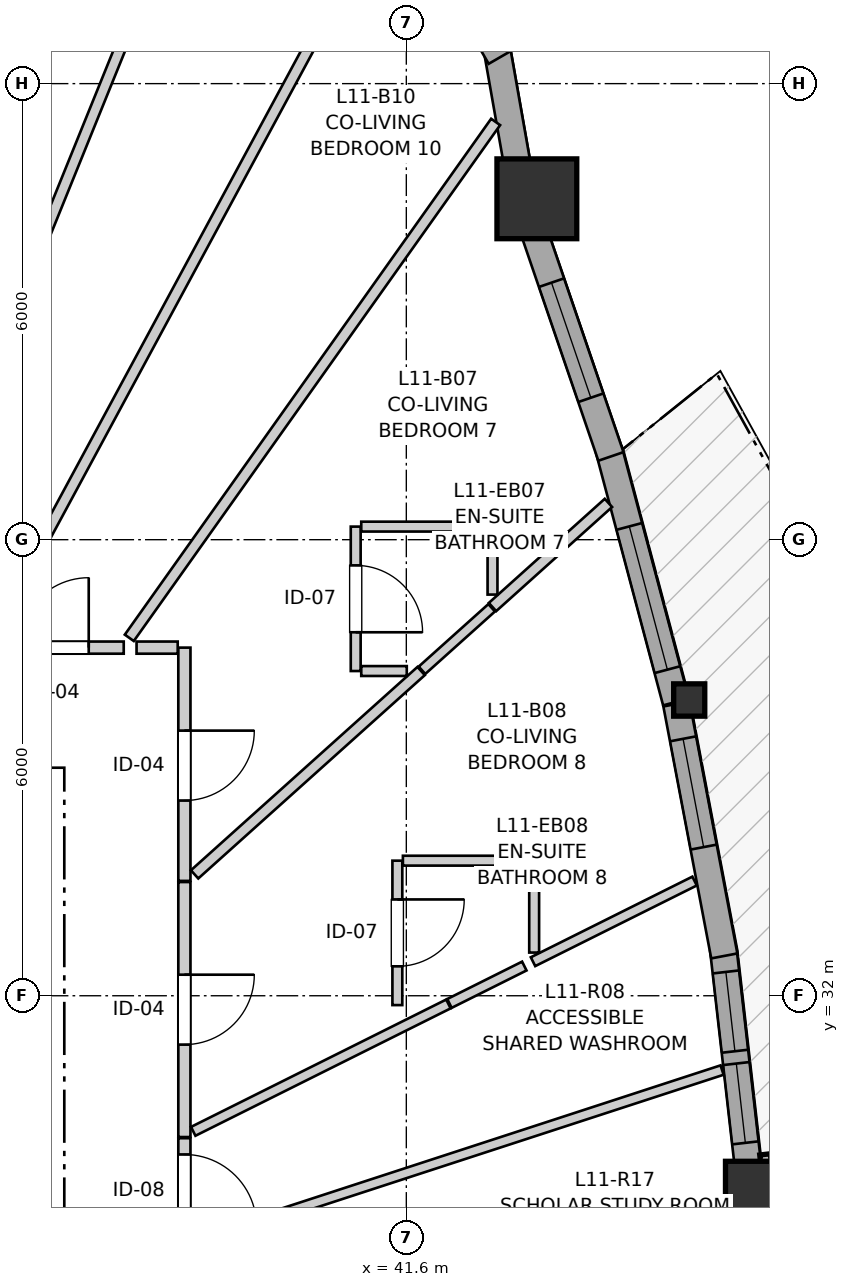
"""IFC4 building model, lengths in metres.
Left out: names, types, materials, properties, quantities, classifications, styles, units other than length and angle.
Written with IfcOpenShell. Run it as: python <this file> out.ifc"""

import sys

from ifc_helpers import new_model, si_unit, direction, frame, frame_2d, origin, origin_2d, place, context, subcontext, project, spatial, rectangle, i_section, extrude, source, transform, mapped, element, fill, save


model = new_model("IFC4")
c1 = context("Model", 3, precision=1e-05, world=origin(), true_north=direction((0.0, 1.0)))
c2 = subcontext(c1, "Body", "Model", "MODEL_VIEW")
j1 = project(units=[si_unit("LENGTHUNIT", "METRE"), si_unit("PLANEANGLEUNIT", "RADIAN")], contexts=[c1])
p1 = place(None, origin())
s1 = spatial("IfcSite", under=j1, at=p1, CompositionType="ELEMENT")
p2 = place(p1, origin())
s2 = spatial("IfcBuilding", under=s1, at=p2, CompositionType="ELEMENT")
p3 = place(p2, frame((0.0, 0.0, 39.8)))
s3 = spatial("IfcBuildingStorey", under=s2, at=p3, CompositionType="ELEMENT", Elevation=39.8)
m1 = source(origin(), c2, "Body", "SweptSolid", [
    extrude(rectangle(XDim=1.05, YDim=1.05, at=origin_2d()), origin(), (0.0, 0.0, 1.0), 2.94),
])
p4 = place(p3, frame((46.324, 29.297, 0.0), z_axis=(0.0, 0.0, 1.0), x_axis=(1.0, 0.0, 0.0)))
e1 = element("IfcColumn", 1, at=p4, inside=s3, PredefinedType="COLUMN", context=c2, shape_type="MappedRepresentation", body=[
    mapped(m1, transform((0.0, 0.0, 0.0), x_axis=(1.0, 0.0, 0.0), y_axis=(0.0, 1.0, 0.0), z_axis=(0.0, 0.0, 1.0), scale=1.0)),
])
m2 = source(origin(), c2, "Body", "SweptSolid", [
    extrude(i_section(OverallWidth=0.409, OverallDepth=0.425, WebThickness=0.03, FlangeThickness=0.048, FilletRadius=0.015, at=origin_2d()), origin(), (0.0, 0.0, 1.0), 2.94),
])
p5 = place(p3, frame((45.322, 35.891, 0.0), z_axis=(0.0, 0.0, 1.0), x_axis=(1.0, 0.0, 0.0)))
e2 = element("IfcColumn", 2, at=p5, inside=s3, PredefinedType="PILASTER", context=c2, shape_type="MappedRepresentation", body=[
    mapped(m2, transform((0.0, 0.0, 0.0), x_axis=(1.0, 0.0, 0.0), y_axis=(0.0, 1.0, 0.0), z_axis=(0.0, 0.0, 1.0), scale=1.0)),
])
p6 = place(p3, frame((43.317, 42.485, 0.0), z_axis=(0.0, 0.0, 1.0), x_axis=(1.0, 0.0, 0.0)))
e3 = element("IfcColumn", 3, at=p6, inside=s3, PredefinedType="COLUMN", context=c2, shape_type="MappedRepresentation", body=[
    mapped(m1, transform((0.0, 0.0, 0.0), x_axis=(1.0, 0.0, 0.0), y_axis=(0.0, 1.0, 0.0), z_axis=(0.0, 0.0, 1.0), scale=1.0)),
])
p7 = place(p3, frame((46.116, 29.575, 0.0), z_axis=(0.0, 0.0, 1.0), x_axis=(-0.113271733229, 0.993564046477, 0.0)))
e4 = element("IfcWall", 4, at=p7, inside=s3, PredefinedType="SOLIDWALL", context=c2, shape_type="SweptSolid", body=[
    extrude(rectangle(XDim=3.056, YDim=0.35, at=frame_2d((1.528, 0.0))), origin(), (0.0, 0.0, 1.0), 2.42),
])
p8 = place(p7, frame((0.492, 0.0, 0.82)))
e5 = element("IfcOpeningElement", 5, at=p8, cuts=e4, PredefinedType="OPENING", context=c2, shape_type="SweptSolid", body=[
    extrude(rectangle(XDim=1.05, YDim=1.45, at=frame_2d((0.525, 0.725))), frame((0.0, 0.185, 0.0), z_axis=(0.0, -1.0, 0.0), x_axis=(1.0, 0.0, 0.0)), (0.0, 0.0, 1.0), 0.37),
])
p9 = place(p7, frame((1.706, 0.0, 0.82)))
e6 = element("IfcOpeningElement", 6, at=p9, cuts=e4, PredefinedType="OPENING", context=c2, shape_type="SweptSolid", body=[
    extrude(rectangle(XDim=1.05, YDim=1.45, at=frame_2d((0.525, 0.725))), frame((0.0, 0.185, 0.0), z_axis=(0.0, -1.0, 0.0), x_axis=(1.0, 0.0, 0.0)), (0.0, 0.0, 1.0), 0.37),
])
p10 = place(p3, frame((45.784, 32.524, 0.0), z_axis=(0.0, 0.0, 1.0), x_axis=(-0.186686485801, 0.982419541754, 0.0)))
e7 = element("IfcWall", 7, at=p10, inside=s3, PredefinedType="SOLIDWALL", context=c2, shape_type="SweptSolid", body=[
    extrude(rectangle(XDim=3.374, YDim=0.35, at=frame_2d((1.687, 0.0))), origin(), (0.0, 0.0, 1.0), 2.42),
])
p11 = place(p10, frame((1.457, 0.0, 0.82)))
e8 = element("IfcOpeningElement", 8, at=p11, cuts=e7, PredefinedType="OPENING", context=c2, shape_type="SweptSolid", body=[
    extrude(rectangle(XDim=1.45, YDim=1.25, at=frame_2d((0.725, 0.625))), frame((0.0, 0.185, 0.0), z_axis=(0.0, -1.0, 0.0), x_axis=(1.0, 0.0, 0.0)), (0.0, 0.0, 1.0), 0.37),
])
p12 = place(p3, frame((45.148, 35.865, 0.0), z_axis=(0.0, 0.0, 1.0), x_axis=(-0.257064434129, 0.966394265663, 0.0)))
e9 = element("IfcWall", 9, at=p12, inside=s3, PredefinedType="SOLIDWALL", context=c2, shape_type="SweptSolid", body=[
    extrude(rectangle(XDim=3.429, YDim=0.35, at=frame_2d((1.715, 0.0))), origin(), (0.0, 0.0, 1.0), 2.42),
])
p13 = place(p12, frame((0.44, 0.0, 0.82)))
e10 = element("IfcOpeningElement", 10, at=p13, cuts=e9, PredefinedType="OPENING", context=c2, shape_type="SweptSolid", body=[
    extrude(rectangle(XDim=1.95, YDim=1.4, at=frame_2d((0.975, 0.7))), frame((0.0, 0.185, 0.0), z_axis=(0.0, -1.0, 0.0), x_axis=(1.0, 0.0, 0.0)), (0.0, 0.0, 1.0), 0.37),
])
p14 = place(p3, frame((44.292, 39.095, 0.0), z_axis=(0.0, 0.0, 1.0), x_axis=(-0.323582370233, 0.946200005112, 0.0)))
e11 = element("IfcWall", 11, at=p14, inside=s3, PredefinedType="SOLIDWALL", context=c2, shape_type="SweptSolid", body=[
    extrude(rectangle(XDim=3.222, YDim=0.35, at=frame_2d((1.611, 0.0))), origin(), (0.0, 0.0, 1.0), 2.42),
])
p15 = place(p14, frame((0.816, 0.0, 0.82)))
e12 = element("IfcOpeningElement", 12, at=p15, cuts=e11, PredefinedType="OPENING", context=c2, shape_type="SweptSolid", body=[
    extrude(rectangle(XDim=1.6, YDim=1.35, at=frame_2d((0.8, 0.675))), frame((0.0, 0.185, 0.0), z_axis=(0.0, -1.0, 0.0), x_axis=(1.0, 0.0, 0.0)), (0.0, 0.0, 1.0), 0.37),
])
p16 = place(p3, frame((43.093, 42.75, 0.0), z_axis=(0.0, 0.0, 1.0), x_axis=(-0.173610462023, 0.984814402553, 0.0)))
e13 = element("IfcWall", 13, at=p16, inside=s3, PredefinedType="SOLIDWALL", context=c2, shape_type="SweptSolid", body=[
    extrude(rectangle(XDim=1.752, YDim=0.35, at=frame_2d((0.876, 0.0))), origin(), (0.0, 0.0, 1.0), 2.42),
])
p17 = place(p3, frame((42.835, 44.348, 0.0), z_axis=(0.0, 0.0, 1.0), x_axis=(-0.499995423472, 0.866028046028, 0.0)))
e14 = element("IfcWall", 14, at=p17, inside=s3, PredefinedType="SOLIDWALL", context=c2, shape_type="SweptSolid", body=[
    extrude(rectangle(XDim=2.09, YDim=0.35, at=frame_2d((1.045, 0.0))), origin(), (0.0, 0.0, 1.0), 2.42),
])
p18 = place(p17, frame((0.42, 0.0, 0.82)))
e15 = element("IfcOpeningElement", 15, at=p18, cuts=e14, PredefinedType="OPENING", context=c2, shape_type="SweptSolid", body=[
    extrude(rectangle(XDim=1.25, YDim=1.35, at=frame_2d((0.625, 0.675))), frame((0.0, 0.185, 0.0), z_axis=(0.0, -1.0, 0.0), x_axis=(1.0, 0.0, 0.0)), (0.0, 0.0, 1.0), 0.37),
])
p19 = place(p3, frame((38.68, 33.496, 0.0), z_axis=(0.0, 0.0, 1.0), x_axis=(0.0, -1.0, 0.0)))
e16 = element("IfcWall", 16, at=p19, inside=s3, PredefinedType="PARTITIONING", context=c2, shape_type="SweptSolid", body=[
    extrude(rectangle(XDim=3.355, YDim=0.16, at=frame_2d((1.677, 0.0))), origin(), (0.0, 0.0, 1.0), 2.94),
])
p20 = place(p19, frame((1.219, 0.0, 0.0)))
e17 = element("IfcOpeningElement", 17, at=p20, cuts=e16, PredefinedType="OPENING", context=c2, shape_type="SweptSolid", body=[
    extrude(rectangle(XDim=0.92, YDim=2.1, at=frame_2d((0.46, 1.05))), frame((0.0, 0.09, 0.0), z_axis=(0.0, -1.0, 0.0), x_axis=(1.0, 0.0, 0.0)), (0.0, 0.0, 1.0), 0.18),
])
p21 = place(p3, frame((38.68, 36.58, 0.0), z_axis=(0.0, 0.0, 1.0), x_axis=(0.0, -1.0, 0.0)))
e18 = element("IfcWall", 18, at=p21, inside=s3, PredefinedType="PARTITIONING", context=c2, shape_type="SweptSolid", body=[
    extrude(rectangle(XDim=3.069, YDim=0.16, at=frame_2d((1.535, 0.0))), origin(), (0.0, 0.0, 1.0), 2.94),
])
p22 = place(p21, frame((1.092, 0.0, 0.0)))
e19 = element("IfcOpeningElement", 19, at=p22, cuts=e18, PredefinedType="OPENING", context=c2, shape_type="SweptSolid", body=[
    extrude(rectangle(XDim=0.92, YDim=2.1, at=frame_2d((0.46, 1.05))), frame((0.0, 0.09, 0.0), z_axis=(0.0, -1.0, 0.0), x_axis=(1.0, 0.0, 0.0)), (0.0, 0.0, 1.0), 0.18),
])
p23 = place(p3, frame((41.482, 33.777, 0.0), z_axis=(0.0, 0.0, 1.0), x_axis=(0.0, -1.0, 0.0)))
e20 = element("IfcWall", 20, at=p23, inside=s3, PredefinedType="PARTITIONING", context=c2, shape_type="SweptSolid", body=[
    extrude(rectangle(XDim=1.9, YDim=0.13, at=frame_2d((0.95, 0.0))), origin(), (0.0, 0.0, 1.0), 2.94),
])
p24 = place(p23, frame((0.51, 0.0, 0.0)))
e21 = element("IfcOpeningElement", 21, at=p24, cuts=e20, PredefinedType="OPENING", context=c2, shape_type="SweptSolid", body=[
    extrude(rectangle(XDim=0.88, YDim=2.05, at=frame_2d((0.44, 1.025))), frame((0.0, 0.075, 0.0), z_axis=(0.0, -1.0, 0.0), x_axis=(1.0, 0.0, 0.0)), (0.0, 0.0, 1.0), 0.15),
])
p25 = place(p3, frame((40.934, 38.172, 0.0), z_axis=(0.0, 0.0, 1.0), x_axis=(0.0, -1.0, 0.0)))
e22 = element("IfcWall", 22, at=p25, inside=s3, PredefinedType="PARTITIONING", context=c2, shape_type="SweptSolid", body=[
    extrude(rectangle(XDim=1.9, YDim=0.13, at=frame_2d((0.95, 0.0))), origin(), (0.0, 0.0, 1.0), 2.94),
])
p26 = place(p25, frame((0.51, 0.0, 0.0)))
e23 = element("IfcOpeningElement", 23, at=p26, cuts=e22, PredefinedType="OPENING", context=c2, shape_type="SweptSolid", body=[
    extrude(rectangle(XDim=0.88, YDim=2.05, at=frame_2d((0.44, 1.025))), frame((0.0, 0.075, 0.0), z_axis=(0.0, -1.0, 0.0), x_axis=(1.0, 0.0, 0.0)), (0.0, 0.0, 1.0), 0.15),
])
p27 = place(p3, frame((36.042, 36.58, 0.0), z_axis=(0.0, 0.0, 1.0), x_axis=(1.0, 0.0, 0.0)))
e24 = element("IfcWall", 24, at=p27, inside=s3, PredefinedType="PARTITIONING", context=c2, shape_type="SweptSolid", body=[
    extrude(rectangle(XDim=1.84, YDim=0.16, at=frame_2d((0.92, 0.0))), origin(), (0.0, 0.0, 1.0), 2.94),
])
p28 = place(p27, frame((0.459, 0.0, 0.0)))
e25 = element("IfcOpeningElement", 25, at=p28, cuts=e24, PredefinedType="OPENING", context=c2, shape_type="SweptSolid", body=[
    extrude(rectangle(XDim=0.92, YDim=2.1, at=frame_2d((0.46, 1.05))), frame((0.0, 0.09, 0.0), z_axis=(0.0, -1.0, 0.0), x_axis=(1.0, 0.0, 0.0)), (0.0, 0.0, 1.0), 0.18),
])
p29 = place(p3, frame((38.68, 30.126, 0.0), z_axis=(0.0, 0.0, 1.0), x_axis=(0.0, -1.0, 0.0)))
e26 = element("IfcWall", 26, at=p29, inside=s3, PredefinedType="PARTITIONING", context=c2, shape_type="SweptSolid", body=[
    extrude(rectangle(XDim=1.426, YDim=0.16, at=frame_2d((0.713, 0.0))), origin(), (0.0, 0.0, 1.0), 2.94),
])
p30 = place(p29, frame((0.214, 0.0, 0.0)))
e27 = element("IfcOpeningElement", 27, at=p30, cuts=e26, PredefinedType="OPENING", context=c2, shape_type="SweptSolid", body=[
    extrude(rectangle(XDim=0.95, YDim=2.1, at=frame_2d((0.475, 1.05))), frame((0.0, 0.09, 0.0), z_axis=(0.0, -1.0, 0.0), x_axis=(1.0, 0.0, 0.0)), (0.0, 0.0, 1.0), 0.18),
])
p31 = place(p3, frame((34.686, 36.695, 0.0), z_axis=(0.0, 0.0, 1.0), x_axis=(0.375735926904, 0.926726773776, 0.0)))
e28 = element("IfcWall", 28, at=p31, inside=s3, PredefinedType="PARTITIONING", context=c2, shape_type="SweptSolid", body=[
    extrude(rectangle(XDim=11.769, YDim=0.145, at=frame_2d((5.884, 0.0))), origin(), (0.0, 0.0, 1.0), 2.94),
])
p32 = place(p3, frame((36.125, 36.701, 0.0), z_axis=(0.0, 0.0, 1.0), x_axis=(0.474948586069, 0.880013545686, 0.0)))
e29 = element("IfcWall", 29, at=p32, inside=s3, PredefinedType="PARTITIONING", context=c2, shape_type="SweptSolid", body=[
    extrude(rectangle(XDim=10.889, YDim=0.145, at=frame_2d((5.445, 0.0))), origin(), (0.0, 0.0, 1.0), 2.94),
])
p33 = place(p3, frame((37.955, 36.708, 0.0), z_axis=(0.0, 0.0, 1.0), x_axis=(0.578991718582, 0.81533342248, 0.0)))
e30 = element("IfcWall", 30, at=p33, inside=s3, PredefinedType="PARTITIONING", context=c2, shape_type="SweptSolid", body=[
    extrude(rectangle(XDim=8.325, YDim=0.145, at=frame_2d((4.163, 0.0))), origin(), (0.0, 0.0, 1.0), 2.94),
])
p34 = place(p3, frame((38.788, 28.751, 0.0), z_axis=(0.0, 0.0, 1.0), x_axis=(0.95075822996, 0.309933522169, 0.0)))
e31 = element("IfcWall", 31, at=p34, inside=s3, PredefinedType="PARTITIONING", context=c2, shape_type="SweptSolid", body=[
    extrude(rectangle(XDim=7.327, YDim=0.13, at=frame_2d((3.664, 0.0))), origin(), (0.0, 0.0, 1.0), 2.94),
])
p35 = place(p3, frame((38.814, 33.597, 0.0), z_axis=(0.0, 0.0, 1.0), x_axis=(0.74417856937, 0.667980730927, 0.0)))
e32 = element("IfcWall", 32, at=p35, inside=s3, PredefinedType="PARTITIONING", context=c2, shape_type="SweptSolid", body=[
    extrude(rectangle(XDim=4.005, YDim=0.145, at=frame_2d((2.002, 0.0))), origin(), (0.0, 0.0, 1.0), 2.94),
])
p36 = place(p3, frame((38.796, 30.216, 0.0), z_axis=(0.0, 0.0, 1.0), x_axis=(0.894739227469, 0.446588977503, 0.0)))
e33 = element("IfcWall", 33, at=p36, inside=s3, PredefinedType="PARTITIONING", context=c2, shape_type="SweptSolid", body=[
    extrude(rectangle(XDim=3.753, YDim=0.13, at=frame_2d((1.876, 0.0))), origin(), (0.0, 0.0, 1.0), 2.94),
])
p37 = place(p3, frame((43.267, 32.448, 0.0), z_axis=(0.0, 0.0, 1.0), x_axis=(0.894755827923, 0.446555717014, 0.0)))
e34 = element("IfcWall", 34, at=p37, inside=s3, PredefinedType="PARTITIONING", context=c2, shape_type="SweptSolid", body=[
    extrude(rectangle(XDim=2.375, YDim=0.13, at=frame_2d((1.188, 0.0))), origin(), (0.0, 0.0, 1.0), 2.94),
])
p38 = place(p3, frame((42.734, 37.114, 0.0), z_axis=(0.0, 0.0, 1.0), x_axis=(0.743962922365, 0.668220899214, 0.0)))
e35 = element("IfcWall", 35, at=p38, inside=s3, PredefinedType="PARTITIONING", context=c2, shape_type="SweptSolid", body=[
    extrude(rectangle(XDim=2.05, YDim=0.145, at=frame_2d((1.025, 0.0))), origin(), (0.0, 0.0, 1.0), 2.94),
])
p39 = place(p3, frame((41.007, 38.172, 0.0), z_axis=(0.0, 0.0, 1.0), x_axis=(1.0, 0.0, 0.0)))
e36 = element("IfcWall", 36, at=p39, inside=s3, PredefinedType="PARTITIONING", context=c2, shape_type="SweptSolid", body=[
    extrude(rectangle(XDim=1.727, YDim=0.13, at=frame_2d((0.863, 0.0))), origin(), (0.0, 0.0, 1.0), 2.94),
])
p40 = place(p3, frame((41.555, 33.777, 0.0), z_axis=(0.0, 0.0, 1.0), x_axis=(1.0, 0.0, 0.0)))
e37 = element("IfcWall", 37, at=p40, inside=s3, PredefinedType="PARTITIONING", context=c2, shape_type="SweptSolid", body=[
    extrude(rectangle(XDim=1.727, YDim=0.13, at=frame_2d((0.864, 0.0))), origin(), (0.0, 0.0, 1.0), 2.94),
])
p41 = place(p3, frame((43.282, 32.568, 0.0), z_axis=(0.0, 0.0, 1.0), x_axis=(0.0, 1.0, 0.0)))
e38 = element("IfcWall", 38, at=p41, inside=s3, PredefinedType="PARTITIONING", context=c2, shape_type="SweptSolid", body=[
    extrude(rectangle(XDim=1.136, YDim=0.13, at=frame_2d((0.568, 0.0))), origin(), (0.0, 0.0, 1.0), 2.94),
])
p42 = place(p3, frame((41.806, 36.282, 0.0), z_axis=(0.0, 0.0, 1.0), x_axis=(0.744525261569, 0.667594289135, 0.0)))
e39 = element("IfcWall", 39, at=p42, inside=s3, PredefinedType="PARTITIONING", context=c2, shape_type="SweptSolid", body=[
    extrude(rectangle(XDim=1.231, YDim=0.13, at=frame_2d((0.616, 0.0))), origin(), (0.0, 0.0, 1.0), 2.94),
])
p43 = place(p3, frame((42.167, 31.899, 0.0), z_axis=(0.0, 0.0, 1.0), x_axis=(0.894604533516, 0.446858734515, 0.0)))
e40 = element("IfcWall", 40, at=p43, inside=s3, PredefinedType="PARTITIONING", context=c2, shape_type="SweptSolid", body=[
    extrude(rectangle(XDim=1.101, YDim=0.13, at=frame_2d((0.55, 0.0))), origin(), (0.0, 0.0, 1.0), 2.94),
])
p44 = place(p3, frame((42.734, 37.278, 0.0), z_axis=(0.0, 0.0, 1.0), x_axis=(0.0, 1.0, 0.0)))
e41 = element("IfcWall", 41, at=p44, inside=s3, PredefinedType="PARTITIONING", context=c2, shape_type="SweptSolid", body=[
    extrude(rectangle(XDim=0.821, YDim=0.13, at=frame_2d((0.411, 0.0))), origin(), (0.0, 0.0, 1.0), 2.94),
])
p45 = place(p3, frame((41.007, 36.272, 0.0), z_axis=(0.0, 0.0, 1.0), x_axis=(1.0, 0.0, 0.0)))
e42 = element("IfcWall", 42, at=p45, inside=s3, PredefinedType="PARTITIONING", context=c2, shape_type="SweptSolid", body=[
    extrude(rectangle(XDim=0.599, YDim=0.13, at=frame_2d((0.299, 0.0))), origin(), (0.0, 0.0, 1.0), 2.94),
])
p46 = place(p3, frame((38.051, 36.58, 0.0), z_axis=(0.0, 0.0, 1.0), x_axis=(1.0, 0.0, 0.0)))
e43 = element("IfcWall", 43, at=p46, inside=s3, PredefinedType="PARTITIONING", context=c2, shape_type="SweptSolid", body=[
    extrude(rectangle(XDim=0.541, YDim=0.16, at=frame_2d((0.271, 0.0))), origin(), (0.0, 0.0, 1.0), 2.94),
])
m3 = source(origin(), c2, "Body", "SweptSolid", [
    extrude(rectangle(XDim=1.05, YDim=1.45, at=frame_2d((0.525, 0.725))), frame((0.0, 0.03, 0.0), z_axis=(0.0, -1.0, 0.0), x_axis=(1.0, 0.0, 0.0)), (0.0, 0.0, 1.0), 0.06),
])
p47 = place(p8, origin())
e44 = element("IfcWindow", 44, at=p47, inside=s3, PartitioningType="SINGLE_PANEL", PredefinedType="WINDOW", context=c2, shape_type="MappedRepresentation", body=[
    mapped(m3, transform((0.0, 0.0, 0.0), x_axis=(1.0, 0.0, 0.0), y_axis=(0.0, 1.0, 0.0), z_axis=(0.0, 0.0, 1.0), scale=1.0)),
])
fill(e5, e44)
p48 = place(p9, origin())
e45 = element("IfcWindow", 45, at=p48, inside=s3, PartitioningType="SINGLE_PANEL", PredefinedType="WINDOW", context=c2, shape_type="MappedRepresentation", body=[
    mapped(m3, transform((0.0, 0.0, 0.0), x_axis=(1.0, 0.0, 0.0), y_axis=(0.0, 1.0, 0.0), z_axis=(0.0, 0.0, 1.0), scale=1.0)),
])
fill(e6, e45)
m4 = source(origin(), c2, "Body", "SweptSolid", [
    extrude(rectangle(XDim=1.45, YDim=1.25, at=frame_2d((0.725, 0.625))), frame((0.0, 0.03, 0.0), z_axis=(0.0, -1.0, 0.0), x_axis=(1.0, 0.0, 0.0)), (0.0, 0.0, 1.0), 0.06),
])
p49 = place(p11, origin())
e46 = element("IfcWindow", 46, at=p49, inside=s3, PartitioningType="SINGLE_PANEL", PredefinedType="WINDOW", context=c2, shape_type="MappedRepresentation", body=[
    mapped(m4, transform((0.0, 0.0, 0.0), x_axis=(1.0, 0.0, 0.0), y_axis=(0.0, 1.0, 0.0), z_axis=(0.0, 0.0, 1.0), scale=1.0)),
])
fill(e8, e46)
m5 = source(origin(), c2, "Body", "SweptSolid", [
    extrude(rectangle(XDim=1.95, YDim=1.4, at=frame_2d((0.975, 0.7))), frame((0.0, 0.03, 0.0), z_axis=(0.0, -1.0, 0.0), x_axis=(1.0, 0.0, 0.0)), (0.0, 0.0, 1.0), 0.06),
])
p50 = place(p13, origin())
e47 = element("IfcWindow", 47, at=p50, inside=s3, PartitioningType="SINGLE_PANEL", PredefinedType="WINDOW", context=c2, shape_type="MappedRepresentation", body=[
    mapped(m5, transform((0.0, 0.0, 0.0), x_axis=(1.0, 0.0, 0.0), y_axis=(0.0, 1.0, 0.0), z_axis=(0.0, 0.0, 1.0), scale=1.0)),
])
fill(e10, e47)
m6 = source(origin(), c2, "Body", "SweptSolid", [
    extrude(rectangle(XDim=1.6, YDim=1.35, at=frame_2d((0.8, 0.675))), frame((0.0, 0.03, 0.0), z_axis=(0.0, -1.0, 0.0), x_axis=(1.0, 0.0, 0.0)), (0.0, 0.0, 1.0), 0.06),
])
p51 = place(p15, origin())
e48 = element("IfcWindow", 48, at=p51, inside=s3, PartitioningType="SINGLE_PANEL", PredefinedType="WINDOW", context=c2, shape_type="MappedRepresentation", body=[
    mapped(m6, transform((0.0, 0.0, 0.0), x_axis=(1.0, 0.0, 0.0), y_axis=(0.0, 1.0, 0.0), z_axis=(0.0, 0.0, 1.0), scale=1.0)),
])
fill(e12, e48)
m7 = source(origin(), c2, "Body", "SweptSolid", [
    extrude(rectangle(XDim=0.92, YDim=2.1, at=frame_2d((0.46, 1.05))), frame((0.0, 0.025, 0.0), z_axis=(0.0, -1.0, 0.0), x_axis=(1.0, 0.0, 0.0)), (0.0, 0.0, 1.0), 0.05),
])
p52 = place(p20, origin())
e49 = element("IfcDoor", 49, at=p52, inside=s3, OperationType="SINGLE_SWING_LEFT", PredefinedType="DOOR", context=c2, shape_type="MappedRepresentation", body=[
    mapped(m7, transform((0.0, 0.0, 0.0), x_axis=(1.0, 0.0, 0.0), y_axis=(0.0, 1.0, 0.0), z_axis=(0.0, 0.0, 1.0), scale=1.0)),
])
fill(e17, e49)
p53 = place(p22, origin())
e50 = element("IfcDoor", 50, at=p53, inside=s3, OperationType="SINGLE_SWING_LEFT", PredefinedType="DOOR", context=c2, shape_type="MappedRepresentation", body=[
    mapped(m7, transform((0.0, 0.0, 0.0), x_axis=(1.0, 0.0, 0.0), y_axis=(0.0, 1.0, 0.0), z_axis=(0.0, 0.0, 1.0), scale=1.0)),
])
fill(e19, e50)
m8 = source(origin(), c2, "Body", "SweptSolid", [
    extrude(rectangle(XDim=0.88, YDim=2.05, at=frame_2d((0.44, 1.025))), frame((0.0, 0.025, 0.0), z_axis=(0.0, -1.0, 0.0), x_axis=(1.0, 0.0, 0.0)), (0.0, 0.0, 1.0), 0.05),
])
p54 = place(p24, origin())
e51 = element("IfcDoor", 51, at=p54, inside=s3, OperationType="SINGLE_SWING_LEFT", PredefinedType="DOOR", context=c2, shape_type="MappedRepresentation", body=[
    mapped(m8, transform((0.0, 0.0, 0.0), x_axis=(1.0, 0.0, 0.0), y_axis=(0.0, 1.0, 0.0), z_axis=(0.0, 0.0, 1.0), scale=1.0)),
])
fill(e21, e51)
p55 = place(p26, origin())
e52 = element("IfcDoor", 52, at=p55, inside=s3, OperationType="SINGLE_SWING_RIGHT", PredefinedType="DOOR", context=c2, shape_type="MappedRepresentation", body=[
    mapped(m8, transform((0.0, 0.0, 0.0), x_axis=(1.0, 0.0, 0.0), y_axis=(0.0, 1.0, 0.0), z_axis=(0.0, 0.0, 1.0), scale=1.0)),
])
fill(e23, e52)
p56 = place(p28, origin())
e53 = element("IfcDoor", 53, at=p56, inside=s3, OperationType="SINGLE_SWING_RIGHT", PredefinedType="DOOR", context=c2, shape_type="MappedRepresentation", body=[
    mapped(m7, transform((0.0, 0.0, 0.0), x_axis=(1.0, 0.0, 0.0), y_axis=(0.0, 1.0, 0.0), z_axis=(0.0, 0.0, 1.0), scale=1.0)),
])
fill(e25, e53)
m9 = source(origin(), c2, "Body", "SweptSolid", [
    extrude(rectangle(XDim=0.95, YDim=2.1, at=frame_2d((0.475, 1.05))), frame((0.0, 0.025, 0.0), z_axis=(0.0, -1.0, 0.0), x_axis=(1.0, 0.0, 0.0)), (0.0, 0.0, 1.0), 0.05),
])
p57 = place(p30, origin())
e54 = element("IfcDoor", 54, at=p57, inside=s3, OperationType="SINGLE_SWING_RIGHT", PredefinedType="DOOR", context=c2, shape_type="MappedRepresentation", body=[
    mapped(m9, transform((0.0, 0.0, 0.0), x_axis=(1.0, 0.0, 0.0), y_axis=(0.0, 1.0, 0.0), z_axis=(0.0, 0.0, 1.0), scale=1.0)),
])
fill(e27, e54)
save(model, sys.argv[1])
